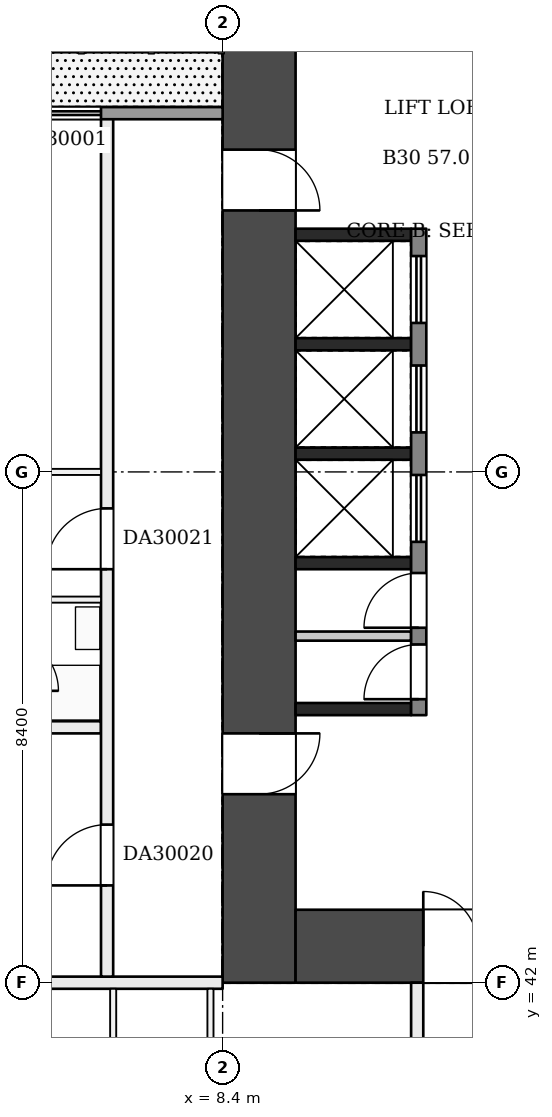
"""IFC4 building model, lengths in metres.
Left out: names, types, materials, properties, quantities, classifications, styles, units other than length and angle.
Written with IfcOpenShell. Run it as: python <this file> out.ifc"""

import sys

from ifc_helpers import new_model, si_unit, direction, frame, frame_2d, origin, place, context, subcontext, project, spatial, rectangle, extrude, element, fill, save


model = new_model("IFC4")
c1 = context("Model", 3, precision=1e-05, world=origin(), true_north=direction((0.0, 1.0)))
c2 = subcontext(c1, "Body", "Model", "MODEL_VIEW")
j1 = project(units=[si_unit("LENGTHUNIT", "METRE"), si_unit("PLANEANGLEUNIT", "RADIAN")], contexts=[c1])
p1 = place(None, origin())
s1 = spatial("IfcSite", under=j1, at=p1, CompositionType="ELEMENT")
p2 = place(p1, origin())
s2 = spatial("IfcBuilding", under=s1, at=p2, CompositionType="ELEMENT")
p3 = place(p2, frame((0.0, 0.0, 119.7)))
s3 = spatial("IfcBuildingStorey", under=s2, at=p3, CompositionType="ELEMENT", Elevation=119.7)
p4 = place(p3, frame((9.0, 58.8, 0.0), z_axis=(0.0, 0.0, 1.0), x_axis=(0.0, -1.0, 0.0)))
e1 = element("IfcWall", 1, at=p4, inside=s3, PredefinedType="SHEAR", context=c2, shape_type="SweptSolid", body=[
    extrude(rectangle(XDim=16.8, YDim=1.2, at=frame_2d((8.4, 0.0))), origin(), (0.0, 0.0, 1.0), 3.22),
])
p5 = place(p4, frame((3.1, 0.0, 0.0)))
e2 = element("IfcOpeningElement", 2, at=p5, cuts=e1, PredefinedType="OPENING", context=c2, shape_type="SweptSolid", body=[
    extrude(rectangle(XDim=1.0, YDim=2.1, at=frame_2d((0.5, 1.05))), frame((0.0, 0.61, 0.0), z_axis=(0.0, -1.0, 0.0), x_axis=(1.0, 0.0, 0.0)), (0.0, 0.0, 1.0), 1.22),
])
p6 = place(p4, frame((12.7, 0.0, 0.0)))
e3 = element("IfcOpeningElement", 3, at=p6, cuts=e1, PredefinedType="OPENING", context=c2, shape_type="SweptSolid", body=[
    extrude(rectangle(XDim=1.0, YDim=2.1, at=frame_2d((0.5, 1.05))), frame((0.0, 0.61, 0.0), z_axis=(0.0, -1.0, 0.0), x_axis=(1.0, 0.0, 0.0)), (0.0, 0.0, 1.0), 1.22),
])
p7 = place(p3, frame((9.6, 42.6, 0.0), z_axis=(0.0, 0.0, 1.0), x_axis=(1.0, 0.0, 0.0)))
e4 = element("IfcWall", 4, at=p7, inside=s3, PredefinedType="SHEAR", context=c2, shape_type="SweptSolid", body=[
    extrude(rectangle(XDim=14.4, YDim=1.2, at=frame_2d((7.2, 0.0))), origin(), (0.0, 0.0, 1.0), 3.22),
])
p8 = place(p7, frame((2.1, 0.0, 0.0)))
e5 = element("IfcOpeningElement", 5, at=p8, cuts=e4, PredefinedType="OPENING", context=c2, shape_type="SweptSolid", body=[
    extrude(rectangle(XDim=1.8, YDim=2.1, at=frame_2d((0.9, 1.05))), frame((0.0, 0.61, 0.0), z_axis=(0.0, -1.0, 0.0), x_axis=(1.0, 0.0, 0.0)), (0.0, 0.0, 1.0), 1.22),
])
for number, where, z_axis, x_axis in (
    (6, (9.6, 54.3, 0.0), (0.0, 0.0, 1.0), (1.0, 0.0, 0.0)),
    (7, (9.6, 52.5, 0.0), (0.0, 0.0, 1.0), (1.0, 0.0, 0.0)),
    (8, (9.6, 50.7, 0.0), (0.0, 0.0, 1.0), (1.0, 0.0, 0.0)),
    (9, (9.6, 48.9, 0.0), (0.0, 0.0, 1.0), (1.0, 0.0, 0.0)),
    (10, (9.6, 46.5, 0.0), (0.0, 0.0, 1.0), (1.0, 0.0, 0.0)),
):
    element("IfcWall", number, at=place(p3, frame(where, z_axis=z_axis, x_axis=x_axis)), inside=s3, PredefinedType="SHEAR", context=c2, shape_type="SweptSolid", body=[
        extrude(rectangle(XDim=1.9, YDim=0.2, at=frame_2d((0.95, 0.0))), origin(), (0.0, 0.0, 1.0), 3.22),
    ])
p9 = place(p3, frame((9.6, 47.7, 0.0), z_axis=(0.0, 0.0, 1.0), x_axis=(1.0, 0.0, 0.0)))
e11 = element("IfcWall", 11, at=p9, inside=s3, PredefinedType="PARTITIONING", context=c2, shape_type="SweptSolid", body=[
    extrude(rectangle(XDim=1.9, YDim=0.15, at=frame_2d((0.95, 0.0))), origin(), (0.0, 0.0, 1.0), 3.22),
])
p10 = place(p3, frame((11.625, 54.4, 0.0), z_axis=(0.0, 0.0, 1.0), x_axis=(0.0, -1.0, 0.0)))
e12 = element("IfcWall", 12, at=p10, inside=s3, PredefinedType="SHEAR", context=c2, shape_type="SweptSolid", body=[
    extrude(rectangle(XDim=8.0, YDim=0.25, at=frame_2d((4.0, 0.0))), origin(), (0.0, 0.0, 1.0), 3.22),
])
p11 = place(p10, frame((0.45, 0.0, 0.0)))
e13 = element("IfcOpeningElement", 13, at=p11, cuts=e12, PredefinedType="OPENING", context=c2, shape_type="SweptSolid", body=[
    extrude(rectangle(XDim=1.1, YDim=2.1, at=frame_2d((0.55, 1.05))), frame((0.0, 0.135, 0.0), z_axis=(0.0, -1.0, 0.0), x_axis=(1.0, 0.0, 0.0)), (0.0, 0.0, 1.0), 0.27),
])
p12 = place(p10, frame((2.25, 0.0, 0.0)))
e14 = element("IfcOpeningElement", 14, at=p12, cuts=e12, PredefinedType="OPENING", context=c2, shape_type="SweptSolid", body=[
    extrude(rectangle(XDim=1.1, YDim=2.1, at=frame_2d((0.55, 1.05))), frame((0.0, 0.135, 0.0), z_axis=(0.0, -1.0, 0.0), x_axis=(1.0, 0.0, 0.0)), (0.0, 0.0, 1.0), 0.27),
])
p13 = place(p10, frame((4.05, 0.0, 0.0)))
e15 = element("IfcOpeningElement", 15, at=p13, cuts=e12, PredefinedType="OPENING", context=c2, shape_type="SweptSolid", body=[
    extrude(rectangle(XDim=1.1, YDim=2.1, at=frame_2d((0.55, 1.05))), frame((0.0, 0.135, 0.0), z_axis=(0.0, -1.0, 0.0), x_axis=(1.0, 0.0, 0.0)), (0.0, 0.0, 1.0), 0.27),
])
p14 = place(p10, frame((5.663, 0.0, 0.0)))
e16 = element("IfcOpeningElement", 16, at=p14, cuts=e12, PredefinedType="OPENING", context=c2, shape_type="SweptSolid", body=[
    extrude(rectangle(XDim=0.9, YDim=2.1, at=frame_2d((0.45, 1.05))), frame((0.0, 0.135, 0.0), z_axis=(0.0, -1.0, 0.0), x_axis=(1.0, 0.0, 0.0)), (0.0, 0.0, 1.0), 0.27),
])
p15 = place(p10, frame((6.837, 0.0, 0.0)))
e17 = element("IfcOpeningElement", 17, at=p15, cuts=e12, PredefinedType="OPENING", context=c2, shape_type="SweptSolid", body=[
    extrude(rectangle(XDim=0.9, YDim=2.1, at=frame_2d((0.45, 1.05))), frame((0.0, 0.135, 0.0), z_axis=(0.0, -1.0, 0.0), x_axis=(1.0, 0.0, 0.0)), (0.0, 0.0, 1.0), 0.27),
])
p16 = place(p3, frame((2.5, 42.0, 0.0), z_axis=(0.0, 0.0, 1.0), x_axis=(1.0, 0.0, 0.0)))
e18 = element("IfcWall", 18, at=p16, inside=s3, PredefinedType="PARTITIONING", context=c2, shape_type="SweptSolid", body=[
    extrude(rectangle(XDim=5.9, YDim=0.2, at=frame_2d((2.95, 0.0))), origin(), (0.0, 0.0, 1.0), 3.22),
])
p17 = place(p3, frame((2.5, 46.2, 0.0), z_axis=(0.0, 0.0, 1.0), x_axis=(1.0, 0.0, 0.0)))
e19 = element("IfcWall", 19, at=p17, inside=s3, PredefinedType="PARTITIONING", context=c2, shape_type="SweptSolid", body=[
    extrude(rectangle(XDim=3.9, YDim=0.2, at=frame_2d((1.95, 0.0))), origin(), (0.0, 0.0, 1.0), 3.22),
])
p18 = place(p3, frame((4.85, 48.3, 0.0), z_axis=(0.0, 0.0, 1.0), x_axis=(1.0, 0.0, 0.0)))
e20 = element("IfcWall", 20, at=p18, inside=s3, PredefinedType="PARTITIONING", context=c2, shape_type="SweptSolid", body=[
    extrude(rectangle(XDim=1.55, YDim=0.1, at=frame_2d((0.775, 0.0))), origin(), (0.0, 0.0, 1.0), 3.22),
])
p19 = place(p3, frame((2.5, 50.4, 0.0), z_axis=(0.0, 0.0, 1.0), x_axis=(1.0, 0.0, 0.0)))
e21 = element("IfcWall", 21, at=p19, inside=s3, PredefinedType="PARTITIONING", context=c2, shape_type="SweptSolid", body=[
    extrude(rectangle(XDim=3.9, YDim=0.1, at=frame_2d((1.95, 0.0))), origin(), (0.0, 0.0, 1.0), 3.22),
])
p20 = place(p19, frame((0.6, 0.0, 0.0)))
e22 = element("IfcOpeningElement", 22, at=p20, cuts=e21, PredefinedType="OPENING", context=c2, shape_type="SweptSolid", body=[
    extrude(rectangle(XDim=0.9, YDim=2.1, at=frame_2d((0.45, 1.05))), frame((0.0, 0.06, 0.0), z_axis=(0.0, -1.0, 0.0), x_axis=(1.0, 0.0, 0.0)), (0.0, 0.0, 1.0), 0.12),
])
p21 = place(p3, frame((6.5, 42.1, 0.0), z_axis=(0.0, 0.0, 1.0), x_axis=(0.0, 1.0, 0.0)))
e23 = element("IfcWall", 23, at=p21, inside=s3, PredefinedType="PARTITIONING", context=c2, shape_type="SweptSolid", body=[
    extrude(rectangle(XDim=14.2, YDim=0.2, at=frame_2d((7.1, 0.0))), origin(), (0.0, 0.0, 1.0), 3.22),
])
p22 = place(p21, frame((1.5, 0.0, 0.0)))
e24 = element("IfcOpeningElement", 24, at=p22, cuts=e23, PredefinedType="OPENING", context=c2, shape_type="SweptSolid", body=[
    extrude(rectangle(XDim=1.0, YDim=2.1, at=frame_2d((0.5, 1.05))), frame((0.0, 0.11, 0.0), z_axis=(0.0, -1.0, 0.0), x_axis=(1.0, 0.0, 0.0)), (0.0, 0.0, 1.0), 0.22),
])
p23 = place(p21, frame((6.7, 0.0, 0.0)))
e25 = element("IfcOpeningElement", 25, at=p23, cuts=e23, PredefinedType="OPENING", context=c2, shape_type="SweptSolid", body=[
    extrude(rectangle(XDim=1.0, YDim=2.1, at=frame_2d((0.5, 1.05))), frame((0.0, 0.11, 0.0), z_axis=(0.0, -1.0, 0.0), x_axis=(1.0, 0.0, 0.0)), (0.0, 0.0, 1.0), 0.22),
])
p24 = place(p3, frame((6.6, 16.85, 0.0), z_axis=(0.0, 0.0, 1.0), x_axis=(0.0, 1.0, 0.0)))
e26 = element("IfcWall", 26, at=p24, inside=s3, PredefinedType="PARTITIONING", context=c2, shape_type="SweptSolid", body=[
    extrude(rectangle(XDim=25.05, YDim=0.1, at=frame_2d((12.525, 0.0))), origin(), (0.0, 0.0, 1.0), 3.22),
])
p25 = place(p24, frame((1.55, 0.0, 0.0)))
e27 = element("IfcOpeningElement", 27, at=p25, cuts=e26, PredefinedType="OPENING", context=c2, shape_type="SweptSolid", body=[
    extrude(rectangle(XDim=0.9, YDim=2.1, at=frame_2d((0.45, 1.05))), frame((0.0, 0.06, 0.0), z_axis=(0.0, -1.0, 0.0), x_axis=(1.0, 0.0, 0.0)), (0.0, 0.0, 1.0), 0.12),
])
p26 = place(p24, frame((7.15, 0.0, 0.0)))
e28 = element("IfcOpeningElement", 28, at=p26, cuts=e26, PredefinedType="OPENING", context=c2, shape_type="SweptSolid", body=[
    extrude(rectangle(XDim=0.9, YDim=2.1, at=frame_2d((0.45, 1.05))), frame((0.0, 0.06, 0.0), z_axis=(0.0, -1.0, 0.0), x_axis=(1.0, 0.0, 0.0)), (0.0, 0.0, 1.0), 0.12),
])
p27 = place(p24, frame((14.15, 0.0, 0.0)))
e29 = element("IfcOpeningElement", 29, at=p27, cuts=e26, PredefinedType="OPENING", context=c2, shape_type="SweptSolid", body=[
    extrude(rectangle(XDim=0.9, YDim=2.1, at=frame_2d((0.45, 1.05))), frame((0.0, 0.06, 0.0), z_axis=(0.0, -1.0, 0.0), x_axis=(1.0, 0.0, 0.0)), (0.0, 0.0, 1.0), 0.12),
])
p28 = place(p24, frame((18.35, 0.0, 0.0)))
e30 = element("IfcOpeningElement", 30, at=p28, cuts=e26, PredefinedType="OPENING", context=c2, shape_type="SweptSolid", body=[
    extrude(rectangle(XDim=0.9, YDim=2.1, at=frame_2d((0.45, 1.05))), frame((0.0, 0.06, 0.0), z_axis=(0.0, -1.0, 0.0), x_axis=(1.0, 0.0, 0.0)), (0.0, 0.0, 1.0), 0.12),
])
p29 = place(p24, frame((22.55, 0.0, 0.0)))
e31 = element("IfcOpeningElement", 31, at=p29, cuts=e26, PredefinedType="OPENING", context=c2, shape_type="SweptSolid", body=[
    extrude(rectangle(XDim=0.9, YDim=2.1, at=frame_2d((0.45, 1.05))), frame((0.0, 0.06, 0.0), z_axis=(0.0, -1.0, 0.0), x_axis=(1.0, 0.0, 0.0)), (0.0, 0.0, 1.0), 0.12),
])
p30 = place(p3, frame((8.2, 21.0, 0.0), z_axis=(0.0, 0.0, 1.0), x_axis=(0.0, 1.0, 0.0)))
e32 = element("IfcWall", 32, at=p30, inside=s3, PredefinedType="PARTITIONING", context=c2, shape_type="SweptSolid", body=[
    extrude(rectangle(XDim=20.9, YDim=0.1, at=frame_2d((10.45, 0.0))), origin(), (0.0, 0.0, 1.0), 3.22),
])
p31 = place(p30, frame((1.0, 0.0, 0.0)))
e33 = element("IfcOpeningElement", 33, at=p31, cuts=e32, PredefinedType="OPENING", context=c2, shape_type="SweptSolid", body=[
    extrude(rectangle(XDim=0.9, YDim=2.1, at=frame_2d((0.45, 1.05))), frame((0.0, 0.06, 0.0), z_axis=(0.0, -1.0, 0.0), x_axis=(1.0, 0.0, 0.0)), (0.0, 0.0, 1.0), 0.12),
])
p32 = place(p30, frame((4.914, 0.0, 0.0)))
e34 = element("IfcOpeningElement", 34, at=p32, cuts=e32, PredefinedType="OPENING", context=c2, shape_type="SweptSolid", body=[
    extrude(rectangle(XDim=0.9, YDim=2.1, at=frame_2d((0.45, 1.05))), frame((0.0, 0.06, 0.0), z_axis=(0.0, -1.0, 0.0), x_axis=(1.0, 0.0, 0.0)), (0.0, 0.0, 1.0), 0.12),
])
p33 = place(p30, frame((7.329, 0.0, 0.0)))
e35 = element("IfcOpeningElement", 35, at=p33, cuts=e32, PredefinedType="OPENING", context=c2, shape_type="SweptSolid", body=[
    extrude(rectangle(XDim=0.9, YDim=2.1, at=frame_2d((0.45, 1.05))), frame((0.0, 0.06, 0.0), z_axis=(0.0, -1.0, 0.0), x_axis=(1.0, 0.0, 0.0)), (0.0, 0.0, 1.0), 0.12),
])
p34 = place(p30, frame((10.243, 0.0, 0.0)))
e36 = element("IfcOpeningElement", 36, at=p34, cuts=e32, PredefinedType="OPENING", context=c2, shape_type="SweptSolid", body=[
    extrude(rectangle(XDim=0.9, YDim=2.1, at=frame_2d((0.45, 1.05))), frame((0.0, 0.06, 0.0), z_axis=(0.0, -1.0, 0.0), x_axis=(1.0, 0.0, 0.0)), (0.0, 0.0, 1.0), 0.12),
])
p35 = place(p30, frame((13.357, 0.0, 0.0)))
e37 = element("IfcOpeningElement", 37, at=p35, cuts=e32, PredefinedType="OPENING", context=c2, shape_type="SweptSolid", body=[
    extrude(rectangle(XDim=0.9, YDim=2.1, at=frame_2d((0.45, 1.05))), frame((0.0, 0.06, 0.0), z_axis=(0.0, -1.0, 0.0), x_axis=(1.0, 0.0, 0.0)), (0.0, 0.0, 1.0), 0.12),
])
p36 = place(p30, frame((15.772, 0.0, 0.0)))
e38 = element("IfcOpeningElement", 38, at=p36, cuts=e32, PredefinedType="OPENING", context=c2, shape_type="SweptSolid", body=[
    extrude(rectangle(XDim=0.9, YDim=2.1, at=frame_2d((0.45, 1.05))), frame((0.0, 0.06, 0.0), z_axis=(0.0, -1.0, 0.0), x_axis=(1.0, 0.0, 0.0)), (0.0, 0.0, 1.0), 0.12),
])
p37 = place(p30, frame((18.986, 0.0, 0.0)))
e39 = element("IfcOpeningElement", 39, at=p37, cuts=e32, PredefinedType="OPENING", context=c2, shape_type="SweptSolid", body=[
    extrude(rectangle(XDim=0.9, YDim=2.1, at=frame_2d((0.45, 1.05))), frame((0.0, 0.06, 0.0), z_axis=(0.0, -1.0, 0.0), x_axis=(1.0, 0.0, 0.0)), (0.0, 0.0, 1.0), 0.12),
])
p38 = place(p3, frame((11.6, 10.9, 0.0), z_axis=(0.0, 0.0, 1.0), x_axis=(0.0, 1.0, 0.0)))
e40 = element("IfcWall", 40, at=p38, inside=s3, PredefinedType="PARTITIONING", context=c2, shape_type="SweptSolid", body=[
    extrude(rectangle(XDim=31.1, YDim=0.2, at=frame_2d((15.55, 0.0))), origin(), (0.0, 0.0, 1.0), 3.22),
])
p39 = place(p38, frame((6.3, 0.0, 0.0)))
e41 = element("IfcOpeningElement", 41, at=p39, cuts=e40, PredefinedType="OPENING", context=c2, shape_type="SweptSolid", body=[
    extrude(rectangle(XDim=1.0, YDim=2.1, at=frame_2d((0.5, 1.05))), frame((0.0, 0.11, 0.0), z_axis=(0.0, -1.0, 0.0), x_axis=(1.0, 0.0, 0.0)), (0.0, 0.0, 1.0), 0.22),
])
p40 = place(p38, frame((11.0, 0.0, 0.0)))
e42 = element("IfcOpeningElement", 42, at=p40, cuts=e40, PredefinedType="OPENING", context=c2, shape_type="SweptSolid", body=[
    extrude(rectangle(XDim=1.0, YDim=2.1, at=frame_2d((0.5, 1.05))), frame((0.0, 0.11, 0.0), z_axis=(0.0, -1.0, 0.0), x_axis=(1.0, 0.0, 0.0)), (0.0, 0.0, 1.0), 0.22),
])
p41 = place(p3, frame((8.4, 56.3, 0.0), z_axis=(0.0, 0.0, 1.0), x_axis=(-1.0, 0.0, 0.0)))
e43 = element("IfcWall", 43, at=p41, inside=s3, PredefinedType="SOLIDWALL", context=c2, shape_type="SweptSolid", body=[
    extrude(rectangle(XDim=3.6, YDim=0.2, at=frame_2d((1.8, 0.0))), origin(), (0.0, 0.0, 1.0), 3.22),
])
p42 = place(p41, frame((2.0, 0.0, 0.0)))
e44 = element("IfcOpeningElement", 44, at=p42, cuts=e43, PredefinedType="OPENING", context=c2, shape_type="SweptSolid", body=[
    extrude(rectangle(XDim=1.3, YDim=2.2, at=frame_2d((0.65, 1.1))), frame((0.0, 0.11, 0.0), z_axis=(0.0, -1.0, 0.0), x_axis=(1.0, 0.0, 0.0)), (0.0, 0.0, 1.0), 0.22),
])
p43 = place(p5, origin())
e45 = element("IfcDoor", 45, at=p43, inside=s3, OperationType="SINGLE_SWING_RIGHT", PredefinedType="DOOR", context=c2, shape_type="SweptSolid", body=[
    extrude(rectangle(XDim=1.0, YDim=2.1, at=frame_2d((0.5, 1.05))), frame((0.0, 0.025, 0.0), z_axis=(0.0, -1.0, 0.0), x_axis=(1.0, 0.0, 0.0)), (0.0, 0.0, 1.0), 0.05),
])
fill(e2, e45)
p44 = place(p6, origin())
e46 = element("IfcDoor", 46, at=p44, inside=s3, OperationType="SINGLE_SWING_LEFT", PredefinedType="DOOR", context=c2, shape_type="SweptSolid", body=[
    extrude(rectangle(XDim=1.0, YDim=2.1, at=frame_2d((0.5, 1.05))), frame((0.0, 0.025, 0.0), z_axis=(0.0, -1.0, 0.0), x_axis=(1.0, 0.0, 0.0)), (0.0, 0.0, 1.0), 0.05),
])
fill(e3, e46)
p45 = place(p8, origin())
e47 = element("IfcDoor", 47, at=p45, inside=s3, OperationType="DOUBLE_DOOR_SINGLE_SWING", PredefinedType="DOOR", context=c2, shape_type="SweptSolid", body=[
    extrude(rectangle(XDim=1.8, YDim=2.1, at=frame_2d((0.9, 1.05))), frame((0.0, 0.025, 0.0), z_axis=(0.0, -1.0, 0.0), x_axis=(1.0, 0.0, 0.0)), (0.0, 0.0, 1.0), 0.05),
])
fill(e5, e47)
p46 = place(p11, origin())
e48 = element("IfcDoor", 48, at=p46, inside=s3, OperationType="DOUBLE_DOOR_SLIDING", PredefinedType="DOOR", context=c2, shape_type="SweptSolid", body=[
    extrude(rectangle(XDim=1.1, YDim=2.1, at=frame_2d((0.55, 1.05))), frame((0.0, 0.025, 0.0), z_axis=(0.0, -1.0, 0.0), x_axis=(1.0, 0.0, 0.0)), (0.0, 0.0, 1.0), 0.05),
])
fill(e13, e48)
p47 = place(p12, origin())
e49 = element("IfcDoor", 49, at=p47, inside=s3, OperationType="DOUBLE_DOOR_SLIDING", PredefinedType="DOOR", context=c2, shape_type="SweptSolid", body=[
    extrude(rectangle(XDim=1.1, YDim=2.1, at=frame_2d((0.55, 1.05))), frame((0.0, 0.025, 0.0), z_axis=(0.0, -1.0, 0.0), x_axis=(1.0, 0.0, 0.0)), (0.0, 0.0, 1.0), 0.05),
])
fill(e14, e49)
p48 = place(p13, origin())
e50 = element("IfcDoor", 50, at=p48, inside=s3, OperationType="DOUBLE_DOOR_SLIDING", PredefinedType="DOOR", context=c2, shape_type="SweptSolid", body=[
    extrude(rectangle(XDim=1.1, YDim=2.1, at=frame_2d((0.55, 1.05))), frame((0.0, 0.025, 0.0), z_axis=(0.0, -1.0, 0.0), x_axis=(1.0, 0.0, 0.0)), (0.0, 0.0, 1.0), 0.05),
])
fill(e15, e50)
p49 = place(p14, frame((0.9, 0.0, 0.0), z_axis=(0.0, 0.0, 1.0), x_axis=(-1.0, 0.0, 0.0)))
e51 = element("IfcDoor", 51, at=p49, inside=s3, OperationType="SINGLE_SWING_LEFT", PredefinedType="DOOR", context=c2, shape_type="SweptSolid", body=[
    extrude(rectangle(XDim=0.9, YDim=2.1, at=frame_2d((0.45, 1.05))), frame((0.0, 0.025, 0.0), z_axis=(0.0, -1.0, 0.0), x_axis=(1.0, 0.0, 0.0)), (0.0, 0.0, 1.0), 0.05),
])
fill(e16, e51)
p50 = place(p15, frame((0.9, 0.0, 0.0), z_axis=(0.0, 0.0, 1.0), x_axis=(-1.0, 0.0, 0.0)))
e52 = element("IfcDoor", 52, at=p50, inside=s3, OperationType="SINGLE_SWING_LEFT", PredefinedType="DOOR", context=c2, shape_type="SweptSolid", body=[
    extrude(rectangle(XDim=0.9, YDim=2.1, at=frame_2d((0.45, 1.05))), frame((0.0, 0.025, 0.0), z_axis=(0.0, -1.0, 0.0), x_axis=(1.0, 0.0, 0.0)), (0.0, 0.0, 1.0), 0.05),
])
fill(e17, e52)
p51 = place(p22, origin())
e53 = element("IfcDoor", 53, at=p51, inside=s3, OperationType="SINGLE_SWING_LEFT", PredefinedType="DOOR", context=c2, shape_type="SweptSolid", body=[
    extrude(rectangle(XDim=1.0, YDim=2.1, at=frame_2d((0.5, 1.05))), frame((0.0, 0.025, 0.0), z_axis=(0.0, -1.0, 0.0), x_axis=(1.0, 0.0, 0.0)), (0.0, 0.0, 1.0), 0.05),
])
fill(e24, e53)
p52 = place(p23, origin())
e54 = element("IfcDoor", 54, at=p52, inside=s3, OperationType="SINGLE_SWING_LEFT", PredefinedType="DOOR", context=c2, shape_type="SweptSolid", body=[
    extrude(rectangle(XDim=1.0, YDim=2.1, at=frame_2d((0.5, 1.05))), frame((0.0, 0.025, 0.0), z_axis=(0.0, -1.0, 0.0), x_axis=(1.0, 0.0, 0.0)), (0.0, 0.0, 1.0), 0.05),
])
fill(e25, e54)
p53 = place(p42, origin())
e55 = element("IfcDoor", 55, at=p53, inside=s3, OperationType="DOUBLE_DOOR_SLIDING", PredefinedType="DOOR", context=c2, shape_type="SweptSolid", body=[
    extrude(rectangle(XDim=1.3, YDim=2.2, at=frame_2d((0.65, 1.1))), frame((0.0, 0.025, 0.0), z_axis=(0.0, -1.0, 0.0), x_axis=(1.0, 0.0, 0.0)), (0.0, 0.0, 1.0), 0.05),
])
fill(e44, e55)
save(model, sys.argv[1])
